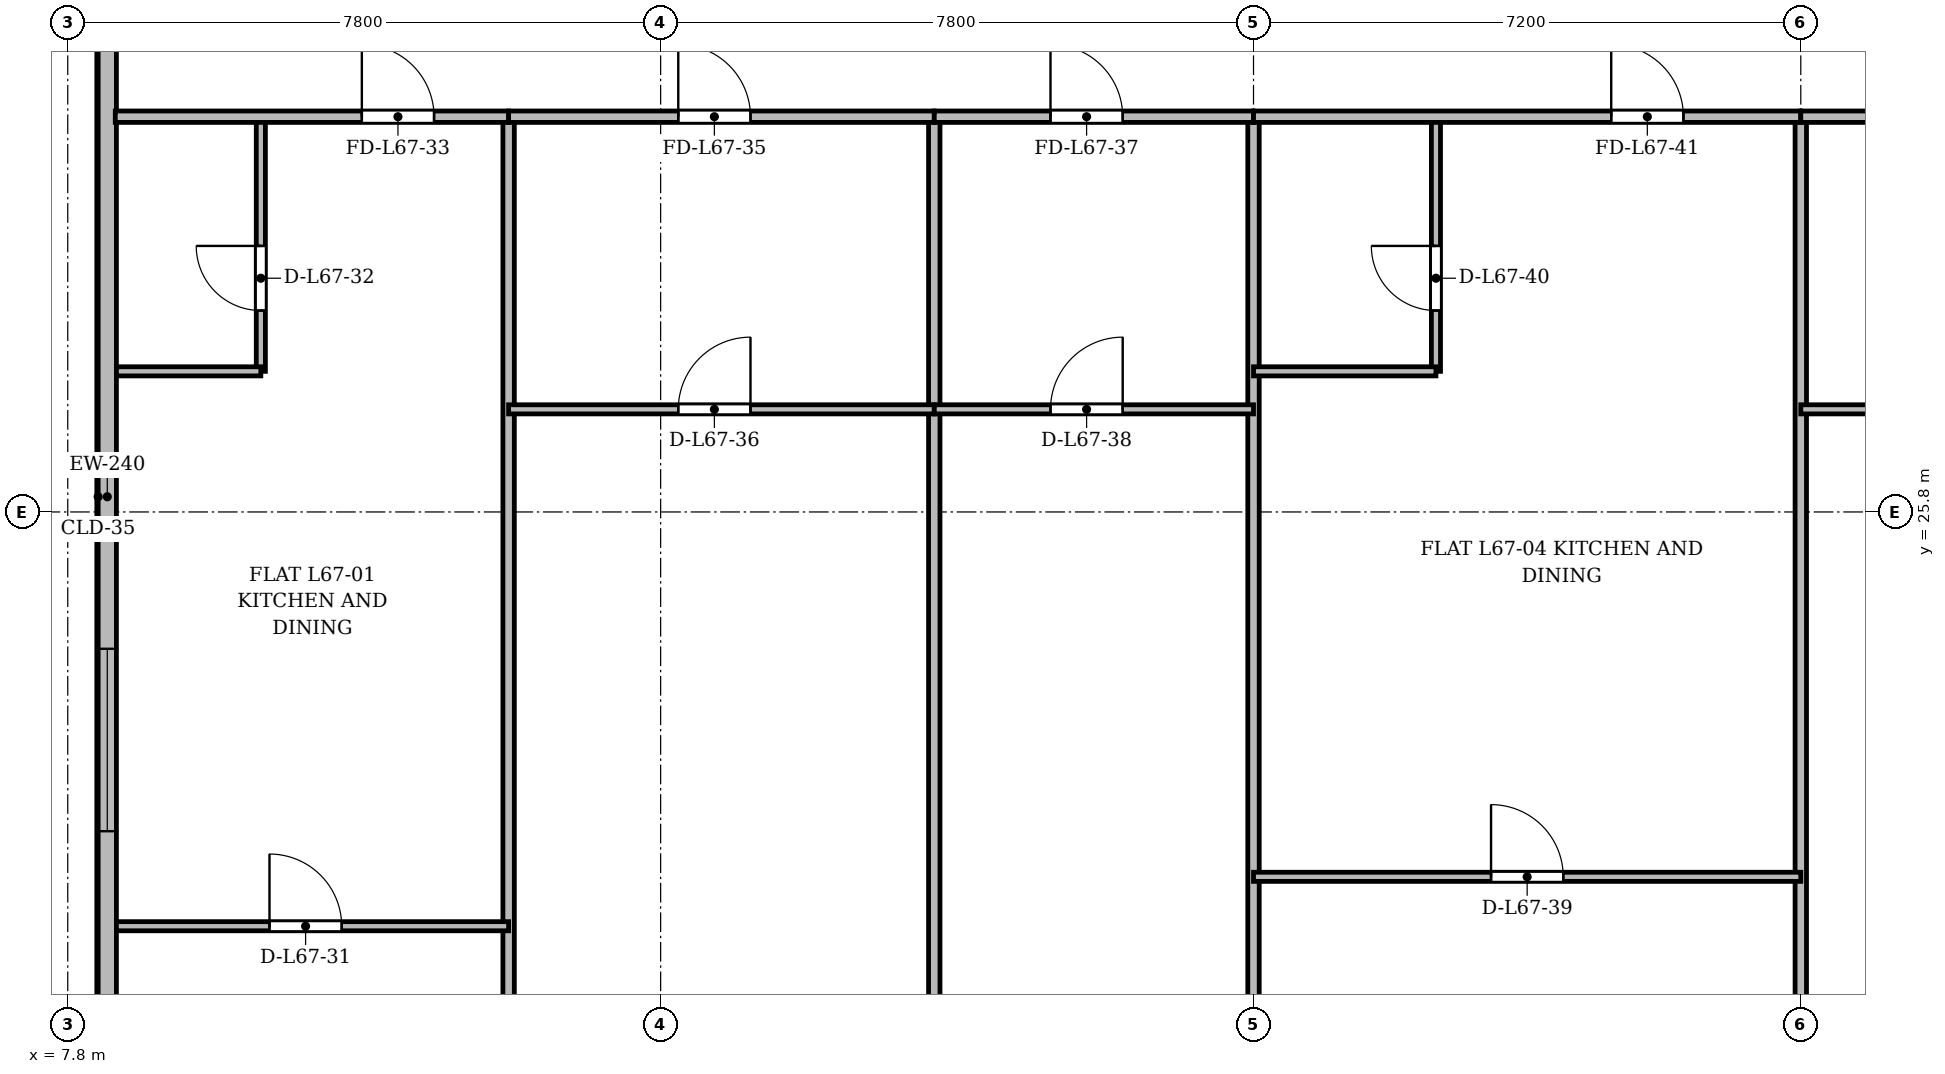
"""IFC4 building model, lengths in metres.
Left out: names, types, materials, properties, quantities, classifications, styles, units other than length and angle.
Written with IfcOpenShell. Run it as: python <this file> out.ifc"""

import sys

from ifc_helpers import new_model, si_unit, direction, frame, frame_2d, origin, place, context, subcontext, project, spatial, rectangle, extrude, source, transform, mapped, element, fill, save


model = new_model("IFC4")
c1 = context("Model", 3, precision=1e-05, world=origin(), true_north=direction((0.0, 1.0)))
c2 = subcontext(c1, "Body", "Model", "MODEL_VIEW")
j1 = project(units=[si_unit("LENGTHUNIT", "METRE"), si_unit("PLANEANGLEUNIT", "RADIAN")], contexts=[c1])
p1 = place(None, origin())
s1 = spatial("IfcSite", under=j1, at=p1, CompositionType="ELEMENT")
p2 = place(p1, origin())
s2 = spatial("IfcBuilding", under=s1, at=p2, CompositionType="ELEMENT")
p3 = place(p2, frame((0.0, 0.0, 259.5)))
s3 = spatial("IfcBuildingStorey", under=s2, at=p3, CompositionType="ELEMENT", Elevation=259.5)
p4 = place(p3, frame((8.32, 6.5, 0.0), z_axis=(0.0, 0.0, 1.0), x_axis=(0.0, 1.0, 0.0)))
e1 = element("IfcWall", 1, at=p4, inside=s3, PredefinedType="SOLIDWALL", context=c2, shape_type="SweptSolid", body=[
    extrude(rectangle(XDim=39.0, YDim=0.24, at=frame_2d((19.5, 0.0))), origin(), (0.0, 0.0, 1.0), 3.37),
])
p5 = place(p4, frame((1.45, 0.0, 0.92)))
e2 = element("IfcOpeningElement", 2, at=p5, cuts=e1, PredefinedType="OPENING", context=c2, shape_type="SweptSolid", body=[
    extrude(rectangle(XDim=1.2, YDim=1.65, at=frame_2d((0.6, 0.825))), frame((0.0, 0.13, 0.0), z_axis=(0.0, -1.0, 0.0), x_axis=(1.0, 0.0, 0.0)), (0.0, 0.0, 1.0), 0.26),
])
p6 = place(p4, frame((3.7, 0.0, 0.92)))
e3 = element("IfcOpeningElement", 3, at=p6, cuts=e1, PredefinedType="OPENING", context=c2, shape_type="SweptSolid", body=[
    extrude(rectangle(XDim=2.4, YDim=2.1, at=frame_2d((1.2, 1.05))), frame((0.0, 0.13, 0.0), z_axis=(0.0, -1.0, 0.0), x_axis=(1.0, 0.0, 0.0)), (0.0, 0.0, 1.0), 0.26),
])
p7 = place(p4, frame((7.9, 0.0, 0.92)))
e4 = element("IfcOpeningElement", 4, at=p7, cuts=e1, PredefinedType="OPENING", context=c2, shape_type="SweptSolid", body=[
    extrude(rectangle(XDim=2.4, YDim=2.1, at=frame_2d((1.2, 1.05))), frame((0.0, 0.13, 0.0), z_axis=(0.0, -1.0, 0.0), x_axis=(1.0, 0.0, 0.0)), (0.0, 0.0, 1.0), 0.26),
])
p8 = place(p4, frame((15.1, 0.0, 0.92)))
e5 = element("IfcOpeningElement", 5, at=p8, cuts=e1, PredefinedType="OPENING", context=c2, shape_type="SweptSolid", body=[
    extrude(rectangle(XDim=2.4, YDim=2.1, at=frame_2d((1.2, 1.05))), frame((0.0, 0.13, 0.0), z_axis=(0.0, -1.0, 0.0), x_axis=(1.0, 0.0, 0.0)), (0.0, 0.0, 1.0), 0.26),
])
p9 = place(p4, frame((33.3, 0.0, 0.92)))
e6 = element("IfcOpeningElement", 6, at=p9, cuts=e1, PredefinedType="OPENING", context=c2, shape_type="SweptSolid", body=[
    extrude(rectangle(XDim=1.2, YDim=1.65, at=frame_2d((0.6, 0.825))), frame((0.0, 0.13, 0.0), z_axis=(0.0, -1.0, 0.0), x_axis=(1.0, 0.0, 0.0)), (0.0, 0.0, 1.0), 0.26),
])
p10 = place(p4, frame((36.65, 0.0, 0.92)))
e7 = element("IfcOpeningElement", 7, at=p10, cuts=e1, PredefinedType="OPENING", context=c2, shape_type="SweptSolid", body=[
    extrude(rectangle(XDim=1.2, YDim=1.65, at=frame_2d((0.6, 0.825))), frame((0.0, 0.13, 0.0), z_axis=(0.0, -1.0, 0.0), x_axis=(1.0, 0.0, 0.0)), (0.0, 0.0, 1.0), 0.26),
])
for number, where, z_axis, x_axis in (
    (8, (13.6, 3.725, 0.0), (0.0, 0.0, 1.0), (0.0, 1.0, 0.0)),
    (9, (19.2, 3.725, 0.0), (0.0, 0.0, 1.0), (0.0, 1.0, 0.0)),
):
    element("IfcWall", number, at=place(p3, frame(where, z_axis=z_axis, x_axis=x_axis)), inside=s3, PredefinedType="PARTITIONING", context=c2, shape_type="SweptSolid", body=[
        extrude(rectangle(XDim=27.275, YDim=0.15, at=frame_2d((13.637, 0.0))), origin(), (0.0, 0.0, 1.0), 2.92),
    ])
for number, where, z_axis, x_axis in (
    (10, (23.4, 3.725, 0.0), (0.0, 0.0, 1.0), (0.0, 1.0, 0.0)),
    (11, (30.6, 3.725, 0.0), (0.0, 0.0, 1.0), (0.0, 1.0, 0.0)),
):
    element("IfcWall", number, at=place(p3, frame(where, z_axis=z_axis, x_axis=x_axis)), inside=s3, PredefinedType="PARTITIONING", context=c2, shape_type="SweptSolid", body=[
        extrude(rectangle(XDim=27.275, YDim=0.15, at=frame_2d((13.637, 0.0))), origin(), (0.0, 0.0, 1.0), 2.87),
    ])
p11 = place(p3, frame((8.44, 20.35, 0.0), z_axis=(0.0, 0.0, 1.0), x_axis=(1.0, 0.0, 0.0)))
e12 = element("IfcWall", 12, at=p11, inside=s3, PredefinedType="PARTITIONING", context=c2, shape_type="SweptSolid", body=[
    extrude(rectangle(XDim=5.16, YDim=0.12, at=frame_2d((2.58, 0.0))), origin(), (0.0, 0.0, 1.0), 2.87),
])
p12 = place(p11, frame((2.014, 0.0, 0.0)))
e13 = element("IfcOpeningElement", 13, at=p12, cuts=e12, PredefinedType="OPENING", context=c2, shape_type="SweptSolid", body=[
    extrude(rectangle(XDim=0.95, YDim=2.15, at=frame_2d((0.475, 1.075))), frame((0.0, 0.07, 0.0), z_axis=(0.0, -1.0, 0.0), x_axis=(1.0, 0.0, 0.0)), (0.0, 0.0, 1.0), 0.14),
])
p13 = place(p3, frame((10.34, 27.65, 0.0), z_axis=(0.0, 0.0, 1.0), x_axis=(0.0, 1.0, 0.0)))
e14 = element("IfcWall", 14, at=p13, inside=s3, PredefinedType="PARTITIONING", context=c2, shape_type="SweptSolid", body=[
    extrude(rectangle(XDim=3.35, YDim=0.12, at=frame_2d((1.675, 0.0))), origin(), (0.0, 0.0, 1.0), 3.37),
])
p14 = place(p13, frame((0.8, 0.0, 0.0)))
e15 = element("IfcOpeningElement", 15, at=p14, cuts=e14, PredefinedType="OPENING", context=c2, shape_type="SweptSolid", body=[
    extrude(rectangle(XDim=0.85, YDim=2.1, at=frame_2d((0.425, 1.05))), frame((0.0, 0.07, 0.0), z_axis=(0.0, -1.0, 0.0), x_axis=(1.0, 0.0, 0.0)), (0.0, 0.0, 1.0), 0.14),
])
p15 = place(p3, frame((8.44, 27.65, 0.0), z_axis=(0.0, 0.0, 1.0), x_axis=(1.0, 0.0, 0.0)))
e16 = element("IfcWall", 16, at=p15, inside=s3, PredefinedType="PARTITIONING", context=c2, shape_type="SweptSolid", body=[
    extrude(rectangle(XDim=1.9, YDim=0.12, at=frame_2d((0.95, 0.0))), origin(), (0.0, 0.0, 1.0), 2.87),
])
p16 = place(p3, frame((8.425, 31.0, 0.0), z_axis=(0.0, 0.0, 1.0), x_axis=(1.0, 0.0, 0.0)))
e17 = element("IfcWall", 17, at=p16, inside=s3, PredefinedType="PARTITIONING", context=c2, shape_type="SweptSolid", body=[
    extrude(rectangle(XDim=5.175, YDim=0.15, at=frame_2d((2.587, 0.0))), origin(), (0.0, 0.0, 1.0), 2.87),
])
p17 = place(p16, frame((3.244, 0.0, 0.0)))
e18 = element("IfcOpeningElement", 18, at=p17, cuts=e17, PredefinedType="OPENING", context=c2, shape_type="SweptSolid", body=[
    extrude(rectangle(XDim=0.95, YDim=2.15, at=frame_2d((0.475, 1.075))), frame((0.0, 0.085, 0.0), z_axis=(0.0, -1.0, 0.0), x_axis=(1.0, 0.0, 0.0)), (0.0, 0.0, 1.0), 0.17),
])
p18 = place(p3, frame((13.6, 31.0, 0.0), z_axis=(0.0, 0.0, 1.0), x_axis=(1.0, 0.0, 0.0)))
e19 = element("IfcWall", 19, at=p18, inside=s3, PredefinedType="PARTITIONING", context=c2, shape_type="SweptSolid", body=[
    extrude(rectangle(XDim=5.6, YDim=0.15, at=frame_2d((2.8, 0.0))), origin(), (0.0, 0.0, 1.0), 2.87),
])
p19 = place(p18, frame((2.232, 0.0, 0.0)))
e20 = element("IfcOpeningElement", 20, at=p19, cuts=e19, PredefinedType="OPENING", context=c2, shape_type="SweptSolid", body=[
    extrude(rectangle(XDim=0.95, YDim=2.15, at=frame_2d((0.475, 1.075))), frame((0.0, 0.085, 0.0), z_axis=(0.0, -1.0, 0.0), x_axis=(1.0, 0.0, 0.0)), (0.0, 0.0, 1.0), 0.17),
])
p20 = place(p3, frame((13.6, 27.15, 0.0), z_axis=(0.0, 0.0, 1.0), x_axis=(1.0, 0.0, 0.0)))
e21 = element("IfcWall", 21, at=p20, inside=s3, PredefinedType="PARTITIONING", context=c2, shape_type="SweptSolid", body=[
    extrude(rectangle(XDim=5.6, YDim=0.12, at=frame_2d((2.8, 0.0))), origin(), (0.0, 0.0, 1.0), 2.87),
])
p21 = place(p20, frame((2.232, 0.0, 0.0)))
e22 = element("IfcOpeningElement", 22, at=p21, cuts=e21, PredefinedType="OPENING", context=c2, shape_type="SweptSolid", body=[
    extrude(rectangle(XDim=0.95, YDim=2.15, at=frame_2d((0.475, 1.075))), frame((0.0, 0.07, 0.0), z_axis=(0.0, -1.0, 0.0), x_axis=(1.0, 0.0, 0.0)), (0.0, 0.0, 1.0), 0.14),
])
p22 = place(p3, frame((19.2, 31.0, 0.0), z_axis=(0.0, 0.0, 1.0), x_axis=(1.0, 0.0, 0.0)))
e23 = element("IfcWall", 23, at=p22, inside=s3, PredefinedType="PARTITIONING", context=c2, shape_type="SweptSolid", body=[
    extrude(rectangle(XDim=4.2, YDim=0.15, at=frame_2d((2.1, 0.0))), origin(), (0.0, 0.0, 1.0), 2.87),
])
p23 = place(p22, frame((1.529, 0.0, 0.0)))
e24 = element("IfcOpeningElement", 24, at=p23, cuts=e23, PredefinedType="OPENING", context=c2, shape_type="SweptSolid", body=[
    extrude(rectangle(XDim=0.95, YDim=2.15, at=frame_2d((0.475, 1.075))), frame((0.0, 0.085, 0.0), z_axis=(0.0, -1.0, 0.0), x_axis=(1.0, 0.0, 0.0)), (0.0, 0.0, 1.0), 0.17),
])
p24 = place(p3, frame((19.2, 27.15, 0.0), z_axis=(0.0, 0.0, 1.0), x_axis=(1.0, 0.0, 0.0)))
e25 = element("IfcWall", 25, at=p24, inside=s3, PredefinedType="PARTITIONING", context=c2, shape_type="SweptSolid", body=[
    extrude(rectangle(XDim=4.2, YDim=0.12, at=frame_2d((2.1, 0.0))), origin(), (0.0, 0.0, 1.0), 2.87),
])
p25 = place(p24, frame((1.529, 0.0, 0.0)))
e26 = element("IfcOpeningElement", 26, at=p25, cuts=e25, PredefinedType="OPENING", context=c2, shape_type="SweptSolid", body=[
    extrude(rectangle(XDim=0.95, YDim=2.15, at=frame_2d((0.475, 1.075))), frame((0.0, 0.07, 0.0), z_axis=(0.0, -1.0, 0.0), x_axis=(1.0, 0.0, 0.0)), (0.0, 0.0, 1.0), 0.14),
])
p26 = place(p3, frame((23.4, 21.0, 0.0), z_axis=(0.0, 0.0, 1.0), x_axis=(1.0, 0.0, 0.0)))
e27 = element("IfcWall", 27, at=p26, inside=s3, PredefinedType="PARTITIONING", context=c2, shape_type="SweptSolid", body=[
    extrude(rectangle(XDim=7.2, YDim=0.12, at=frame_2d((3.6, 0.0))), origin(), (0.0, 0.0, 1.0), 2.87),
])
p27 = place(p26, frame((3.125, 0.0, 0.0)))
e28 = element("IfcOpeningElement", 28, at=p27, cuts=e27, PredefinedType="OPENING", context=c2, shape_type="SweptSolid", body=[
    extrude(rectangle(XDim=0.95, YDim=2.15, at=frame_2d((0.475, 1.075))), frame((0.0, 0.07, 0.0), z_axis=(0.0, -1.0, 0.0), x_axis=(1.0, 0.0, 0.0)), (0.0, 0.0, 1.0), 0.14),
])
p28 = place(p3, frame((25.8, 27.65, 0.0), z_axis=(0.0, 0.0, 1.0), x_axis=(0.0, 1.0, 0.0)))
e29 = element("IfcWall", 29, at=p28, inside=s3, PredefinedType="PARTITIONING", context=c2, shape_type="SweptSolid", body=[
    extrude(rectangle(XDim=3.35, YDim=0.12, at=frame_2d((1.675, 0.0))), origin(), (0.0, 0.0, 1.0), 3.37),
])
p29 = place(p28, frame((0.8, 0.0, 0.0)))
e30 = element("IfcOpeningElement", 30, at=p29, cuts=e29, PredefinedType="OPENING", context=c2, shape_type="SweptSolid", body=[
    extrude(rectangle(XDim=0.85, YDim=2.1, at=frame_2d((0.425, 1.05))), frame((0.0, 0.07, 0.0), z_axis=(0.0, -1.0, 0.0), x_axis=(1.0, 0.0, 0.0)), (0.0, 0.0, 1.0), 0.14),
])
p30 = place(p3, frame((23.4, 27.65, 0.0), z_axis=(0.0, 0.0, 1.0), x_axis=(1.0, 0.0, 0.0)))
e31 = element("IfcWall", 31, at=p30, inside=s3, PredefinedType="PARTITIONING", context=c2, shape_type="SweptSolid", body=[
    extrude(rectangle(XDim=2.4, YDim=0.12, at=frame_2d((1.2, 0.0))), origin(), (0.0, 0.0, 1.0), 2.87),
])
p31 = place(p3, frame((23.4, 31.0, 0.0), z_axis=(0.0, 0.0, 1.0), x_axis=(1.0, 0.0, 0.0)))
e32 = element("IfcWall", 32, at=p31, inside=s3, PredefinedType="PARTITIONING", context=c2, shape_type="SweptSolid", body=[
    extrude(rectangle(XDim=7.2, YDim=0.15, at=frame_2d((3.6, 0.0))), origin(), (0.0, 0.0, 1.0), 2.87),
])
p32 = place(p31, frame((4.706, 0.0, 0.0)))
e33 = element("IfcOpeningElement", 33, at=p32, cuts=e32, PredefinedType="OPENING", context=c2, shape_type="SweptSolid", body=[
    extrude(rectangle(XDim=0.95, YDim=2.15, at=frame_2d((0.475, 1.075))), frame((0.0, 0.085, 0.0), z_axis=(0.0, -1.0, 0.0), x_axis=(1.0, 0.0, 0.0)), (0.0, 0.0, 1.0), 0.17),
])
p33 = place(p3, frame((30.6, 31.0, 0.0), z_axis=(0.0, 0.0, 1.0), x_axis=(1.0, 0.0, 0.0)))
e34 = element("IfcWall", 34, at=p33, inside=s3, PredefinedType="PARTITIONING", context=c2, shape_type="SweptSolid", body=[
    extrude(rectangle(XDim=5.8, YDim=0.15, at=frame_2d((2.9, 0.0))), origin(), (0.0, 0.0, 1.0), 2.87),
])
p34 = place(p33, frame((2.425, 0.0, 0.0)))
e35 = element("IfcOpeningElement", 35, at=p34, cuts=e34, PredefinedType="OPENING", context=c2, shape_type="SweptSolid", body=[
    extrude(rectangle(XDim=0.95, YDim=2.15, at=frame_2d((0.475, 1.075))), frame((0.0, 0.085, 0.0), z_axis=(0.0, -1.0, 0.0), x_axis=(1.0, 0.0, 0.0)), (0.0, 0.0, 1.0), 0.17),
])
p35 = place(p3, frame((30.6, 27.15, 0.0), z_axis=(0.0, 0.0, 1.0), x_axis=(1.0, 0.0, 0.0)))
e36 = element("IfcWall", 36, at=p35, inside=s3, PredefinedType="PARTITIONING", context=c2, shape_type="SweptSolid", body=[
    extrude(rectangle(XDim=5.8, YDim=0.12, at=frame_2d((2.9, 0.0))), origin(), (0.0, 0.0, 1.0), 2.87),
])
p36 = place(p35, frame((2.425, 0.0, 0.0)))
e37 = element("IfcOpeningElement", 37, at=p36, cuts=e36, PredefinedType="OPENING", context=c2, shape_type="SweptSolid", body=[
    extrude(rectangle(XDim=0.95, YDim=2.15, at=frame_2d((0.475, 1.075))), frame((0.0, 0.07, 0.0), z_axis=(0.0, -1.0, 0.0), x_axis=(1.0, 0.0, 0.0)), (0.0, 0.0, 1.0), 0.14),
])
m1 = source(origin(), c2, "Body", "SweptSolid", [
    extrude(rectangle(XDim=2.4, YDim=2.1, at=frame_2d((1.2, 1.05))), frame((0.0, 0.03, 0.0), z_axis=(0.0, -1.0, 0.0), x_axis=(1.0, 0.0, 0.0)), (0.0, 0.0, 1.0), 0.06),
])
p37 = place(p8, origin())
e38 = element("IfcWindow", 38, at=p37, inside=s3, PartitioningType="SINGLE_PANEL", PredefinedType="WINDOW", context=c2, shape_type="MappedRepresentation", body=[
    mapped(m1, transform((0.0, 0.0, 0.0), x_axis=(1.0, 0.0, 0.0), y_axis=(0.0, 1.0, 0.0), z_axis=(0.0, 0.0, 1.0), scale=1.0)),
])
fill(e5, e38)
m2 = source(origin(), c2, "Body", "SweptSolid", [
    extrude(rectangle(XDim=0.95, YDim=2.15, at=frame_2d((0.475, 1.075))), frame((0.0, 0.025, 0.0), z_axis=(0.0, -1.0, 0.0), x_axis=(1.0, 0.0, 0.0)), (0.0, 0.0, 1.0), 0.05),
])
p38 = place(p12, origin())
e39 = element("IfcDoor", 39, at=p38, inside=s3, OperationType="SINGLE_SWING_LEFT", PredefinedType="DOOR", context=c2, shape_type="MappedRepresentation", body=[
    mapped(m2, transform((0.0, 0.0, 0.0), x_axis=(1.0, 0.0, 0.0), y_axis=(0.0, 1.0, 0.0), z_axis=(0.0, 0.0, 1.0), scale=1.0)),
])
fill(e13, e39)
m3 = source(origin(), c2, "Body", "SweptSolid", [
    extrude(rectangle(XDim=0.85, YDim=2.1, at=frame_2d((0.425, 1.05))), frame((0.0, 0.025, 0.0), z_axis=(0.0, -1.0, 0.0), x_axis=(1.0, 0.0, 0.0)), (0.0, 0.0, 1.0), 0.05),
])
p39 = place(p14, origin())
e40 = element("IfcDoor", 40, at=p39, inside=s3, OperationType="SINGLE_SWING_RIGHT", PredefinedType="DOOR", context=c2, shape_type="MappedRepresentation", body=[
    mapped(m3, transform((0.0, 0.0, 0.0), x_axis=(1.0, 0.0, 0.0), y_axis=(0.0, 1.0, 0.0), z_axis=(0.0, 0.0, 1.0), scale=1.0)),
])
fill(e15, e40)
p40 = place(p17, origin())
e41 = element("IfcDoor", 41, at=p40, inside=s3, OperationType="SINGLE_SWING_LEFT", PredefinedType="DOOR", context=c2, shape_type="MappedRepresentation", body=[
    mapped(m2, transform((0.0, 0.0, 0.0), x_axis=(1.0, 0.0, 0.0), y_axis=(0.0, 1.0, 0.0), z_axis=(0.0, 0.0, 1.0), scale=1.0)),
])
fill(e18, e41)
p41 = place(p19, origin())
e42 = element("IfcDoor", 42, at=p41, inside=s3, OperationType="SINGLE_SWING_LEFT", PredefinedType="DOOR", context=c2, shape_type="MappedRepresentation", body=[
    mapped(m2, transform((0.0, 0.0, 0.0), x_axis=(1.0, 0.0, 0.0), y_axis=(0.0, 1.0, 0.0), z_axis=(0.0, 0.0, 1.0), scale=1.0)),
])
fill(e20, e42)
p42 = place(p21, origin())
e43 = element("IfcDoor", 43, at=p42, inside=s3, OperationType="SINGLE_SWING_RIGHT", PredefinedType="DOOR", context=c2, shape_type="MappedRepresentation", body=[
    mapped(m2, transform((0.0, 0.0, 0.0), x_axis=(1.0, 0.0, 0.0), y_axis=(0.0, 1.0, 0.0), z_axis=(0.0, 0.0, 1.0), scale=1.0)),
])
fill(e22, e43)
p43 = place(p23, origin())
e44 = element("IfcDoor", 44, at=p43, inside=s3, OperationType="SINGLE_SWING_LEFT", PredefinedType="DOOR", context=c2, shape_type="MappedRepresentation", body=[
    mapped(m2, transform((0.0, 0.0, 0.0), x_axis=(1.0, 0.0, 0.0), y_axis=(0.0, 1.0, 0.0), z_axis=(0.0, 0.0, 1.0), scale=1.0)),
])
fill(e24, e44)
p44 = place(p25, origin())
e45 = element("IfcDoor", 45, at=p44, inside=s3, OperationType="SINGLE_SWING_RIGHT", PredefinedType="DOOR", context=c2, shape_type="MappedRepresentation", body=[
    mapped(m2, transform((0.0, 0.0, 0.0), x_axis=(1.0, 0.0, 0.0), y_axis=(0.0, 1.0, 0.0), z_axis=(0.0, 0.0, 1.0), scale=1.0)),
])
fill(e26, e45)
p45 = place(p27, origin())
e46 = element("IfcDoor", 46, at=p45, inside=s3, OperationType="SINGLE_SWING_LEFT", PredefinedType="DOOR", context=c2, shape_type="MappedRepresentation", body=[
    mapped(m2, transform((0.0, 0.0, 0.0), x_axis=(1.0, 0.0, 0.0), y_axis=(0.0, 1.0, 0.0), z_axis=(0.0, 0.0, 1.0), scale=1.0)),
])
fill(e28, e46)
p46 = place(p29, origin())
e47 = element("IfcDoor", 47, at=p46, inside=s3, OperationType="SINGLE_SWING_RIGHT", PredefinedType="DOOR", context=c2, shape_type="MappedRepresentation", body=[
    mapped(m3, transform((0.0, 0.0, 0.0), x_axis=(1.0, 0.0, 0.0), y_axis=(0.0, 1.0, 0.0), z_axis=(0.0, 0.0, 1.0), scale=1.0)),
])
fill(e30, e47)
p47 = place(p32, origin())
e48 = element("IfcDoor", 48, at=p47, inside=s3, OperationType="SINGLE_SWING_LEFT", PredefinedType="DOOR", context=c2, shape_type="MappedRepresentation", body=[
    mapped(m2, transform((0.0, 0.0, 0.0), x_axis=(1.0, 0.0, 0.0), y_axis=(0.0, 1.0, 0.0), z_axis=(0.0, 0.0, 1.0), scale=1.0)),
])
fill(e33, e48)
save(model, sys.argv[1])
